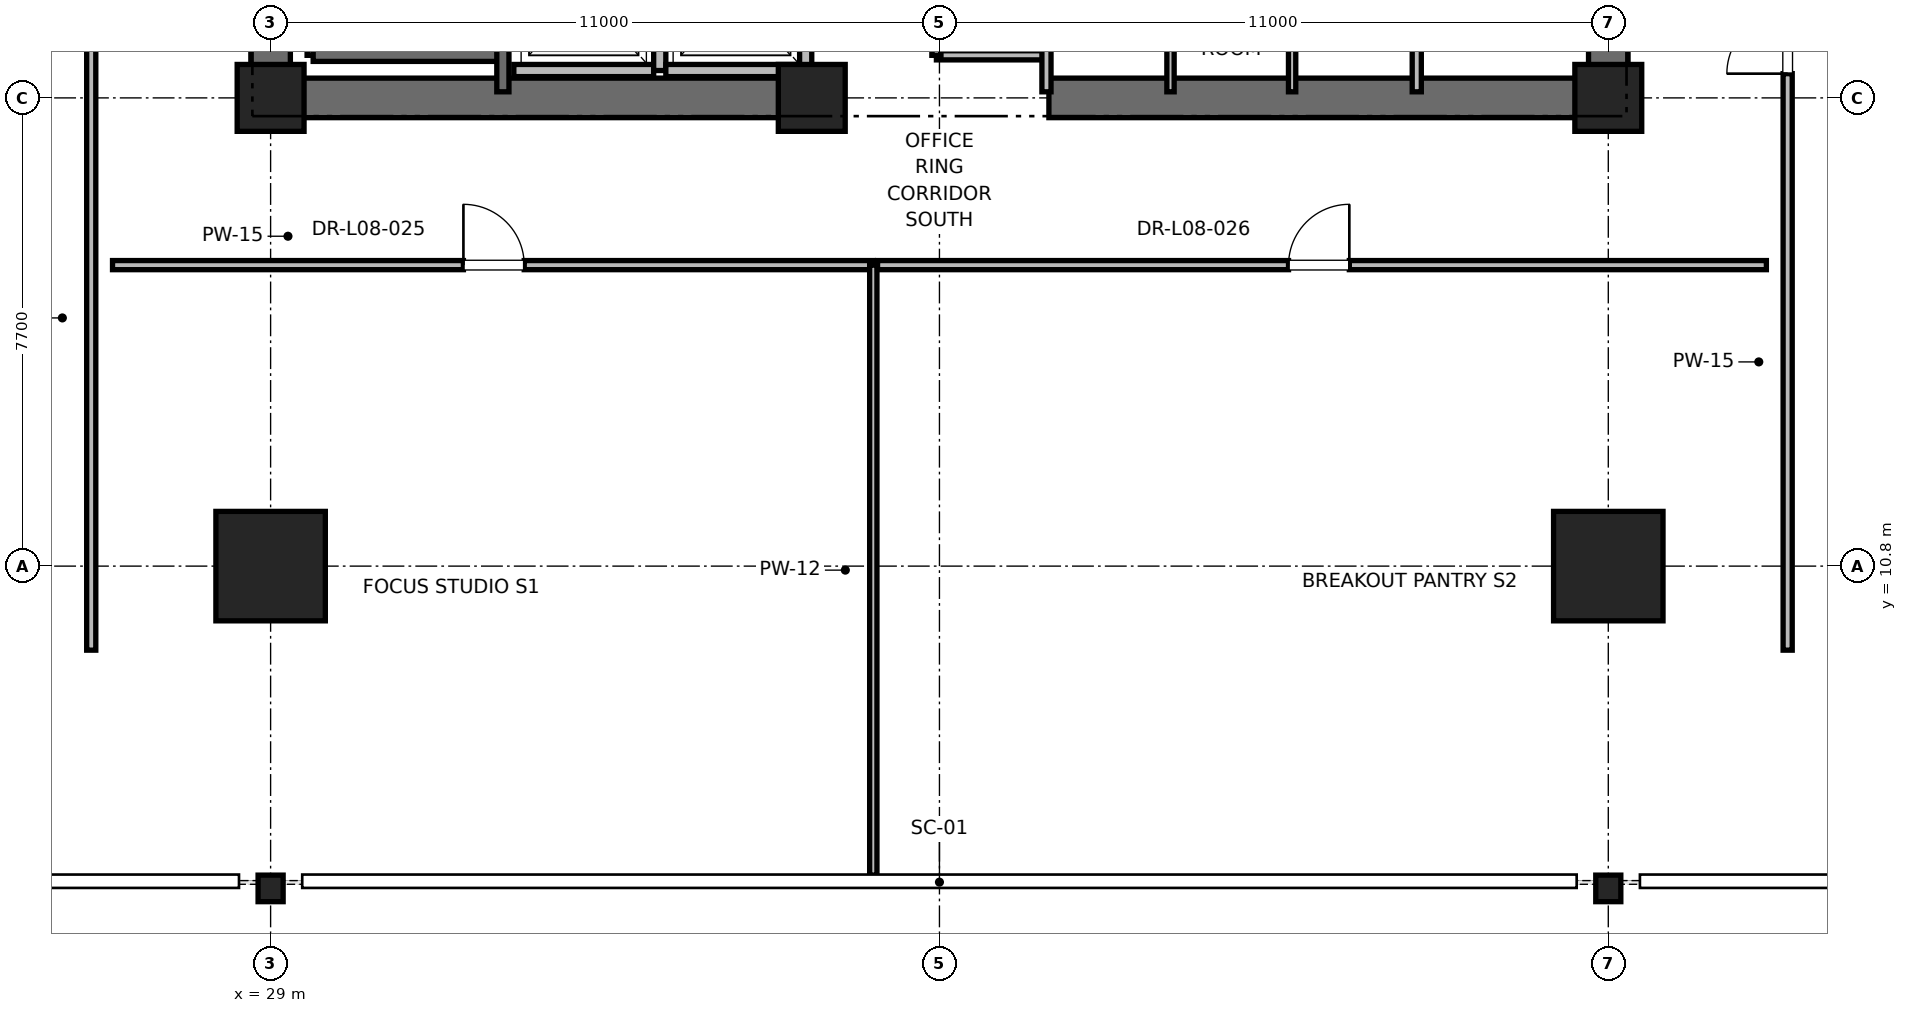
"""IFC4 building model, lengths in metres.
Left out: names, types, materials, properties, quantities, classifications, styles, units other than length and angle.
Written with IfcOpenShell. Run it as: python <this file> out.ifc"""

import sys

from ifc_helpers import new_model, si_unit, direction, frame, frame_2d, origin, origin_2d, place, context, subcontext, project, spatial, rectangle, i_section, extrude, element, fill, save


model = new_model("IFC4")
c1 = context("Model", 3, precision=1e-05, world=origin(), true_north=direction((0.0, 1.0)))
c2 = subcontext(c1, "Body", "Model", "MODEL_VIEW")
j1 = project(units=[si_unit("LENGTHUNIT", "METRE"), si_unit("PLANEANGLEUNIT", "RADIAN")], contexts=[c1])
p1 = place(None, origin())
s1 = spatial("IfcSite", under=j1, at=p1, CompositionType="ELEMENT")
p2 = place(p1, origin())
s2 = spatial("IfcBuilding", under=s1, at=p2, CompositionType="ELEMENT")
p3 = place(p2, frame((0.0, 0.0, 39.6)))
s3 = spatial("IfcBuildingStorey", under=s2, at=p3, CompositionType="ELEMENT", Elevation=39.6)
for number, where, z_axis, x_axis in (
    (1, (29.0, 10.8, 0.0), (0.0, 0.0, 1.0), (1.0, 0.0, 0.0)),
    (2, (51.0, 10.8, 0.0), (0.0, 0.0, 1.0), (1.0, 0.0, 0.0)),
):
    element("IfcColumn", number, at=place(p3, frame(where, z_axis=z_axis, x_axis=x_axis)), inside=s3, PredefinedType="COLUMN", context=c2, shape_type="SweptSolid", body=[
        extrude(rectangle(XDim=1.8, YDim=1.8, at=origin_2d()), origin(), (0.0, 0.0, 1.0), 4.0),
    ])
for number, where, z_axis, x_axis in (
    (3, (29.0, 5.5, 0.0), (0.0, 0.0, 1.0), (1.0, 0.0, 0.0)),
    (4, (51.0, 5.5, 0.0), (0.0, 0.0, 1.0), (1.0, 0.0, 0.0)),
):
    element("IfcColumn", number, at=place(p3, frame(where, z_axis=z_axis, x_axis=x_axis)), inside=s3, PredefinedType="COLUMN", context=c2, shape_type="SweptSolid", body=[
        extrude(i_section(OverallWidth=0.412, OverallDepth=0.437, WebThickness=0.036, FlangeThickness=0.058, FilletRadius=0.015, at=origin_2d()), origin(), (0.0, 0.0, 1.0), 4.0),
    ])
for number, where, z_axis, x_axis in (
    (5, (29.0, 18.5, 0.0), (0.0, 0.0, 1.0), (1.0, 0.0, 0.0)),
    (6, (51.0, 18.5, 0.0), (0.0, 0.0, 1.0), (1.0, 0.0, 0.0)),
    (7, (37.9, 18.5, 0.0), (0.0, 0.0, 1.0), (1.0, 0.0, 0.0)),
):
    element("IfcColumn", number, at=place(p3, frame(where, z_axis=z_axis, x_axis=x_axis)), inside=s3, PredefinedType="PILASTER", context=c2, shape_type="SweptSolid", body=[
        extrude(rectangle(XDim=1.1, YDim=1.1, at=origin_2d()), origin(), (0.0, 0.0, 1.0), 4.0),
    ])
for number, where, z_axis, x_axis in (
    (8, (29.0, 18.5, 0.0), (0.0, 0.0, 1.0), (1.0, 0.0, 0.0)),
    (9, (41.8, 18.5, 0.0), (0.0, 0.0, 1.0), (1.0, 0.0, 0.0)),
):
    element("IfcWall", number, at=place(p3, frame(where, z_axis=z_axis, x_axis=x_axis)), inside=s3, PredefinedType="SHEAR", context=c2, shape_type="SweptSolid", body=[
        extrude(rectangle(XDim=9.2, YDim=0.65, at=frame_2d((4.6, 0.0))), origin(), (0.0, 0.0, 1.0), 3.76),
    ])
p4 = place(p3, frame((29.0, 18.5, 0.0), z_axis=(0.0, 0.0, 1.0), x_axis=(0.0, 1.0, 0.0)))
e10 = element("IfcWall", 10, at=p4, inside=s3, PredefinedType="SHEAR", context=c2, shape_type="SweptSolid", body=[
    extrude(rectangle(XDim=8.8, YDim=0.65, at=frame_2d((4.4, 0.0))), origin(), (0.0, 0.0, 1.0), 3.76),
])
p5 = place(p3, frame((51.0, 18.5, 0.0), z_axis=(0.0, 0.0, 1.0), x_axis=(0.0, 1.0, 0.0)))
e11 = element("IfcWall", 11, at=p5, inside=s3, PredefinedType="SHEAR", context=c2, shape_type="SweptSolid", body=[
    extrude(rectangle(XDim=5.8, YDim=0.65, at=frame_2d((2.9, 0.0))), origin(), (0.0, 0.0, 1.0), 3.76),
])
p6 = place(p3, frame((29.7, 19.2, 0.0), z_axis=(0.0, 0.0, 1.0), x_axis=(0.0, 1.0, 0.0)))
e12 = element("IfcWall", 12, at=p6, inside=s3, PredefinedType="SOLIDWALL", context=c2, shape_type="SweptSolid", body=[
    extrude(rectangle(XDim=8.15, YDim=0.2, at=frame_2d((4.075, 0.0))), origin(), (0.0, 0.0, 1.0), 3.76),
])
p7 = place(p3, frame((29.7, 19.2, 0.0), z_axis=(0.0, 0.0, 1.0), x_axis=(1.0, 0.0, 0.0)))
e13 = element("IfcWall", 13, at=p7, inside=s3, PredefinedType="SOLIDWALL", context=c2, shape_type="SweptSolid", body=[
    extrude(rectangle(XDim=3.12, YDim=0.2, at=frame_2d((1.56, 0.0))), origin(), (0.0, 0.0, 1.0), 3.76),
])
p8 = place(p3, frame((32.82, 18.6, 0.0), z_axis=(0.0, 0.0, 1.0), x_axis=(0.0, 1.0, 0.0)))
e14 = element("IfcWall", 14, at=p8, inside=s3, PredefinedType="SOLIDWALL", context=c2, shape_type="SweptSolid", body=[
    extrude(rectangle(XDim=8.78, YDim=0.2, at=frame_2d((4.39, 0.0))), origin(), (0.0, 0.0, 1.0), 3.76),
])
p9 = place(p3, frame((33.0, 18.95, 0.0), z_axis=(0.0, 0.0, 1.0), x_axis=(1.0, 0.0, 0.0)))
e15 = element("IfcWall", 15, at=p9, inside=s3, PredefinedType="SOLIDWALL", context=c2, shape_type="SweptSolid", body=[
    extrude(rectangle(XDim=2.3, YDim=0.2, at=frame_2d((1.15, 0.0))), origin(), (0.0, 0.0, 1.0), 3.76),
])
p10 = place(p3, frame((35.4, 18.95, 0.0), z_axis=(0.0, 0.0, 1.0), x_axis=(0.0, 1.0, 0.0)))
e16 = element("IfcWall", 16, at=p10, inside=s3, PredefinedType="SOLIDWALL", context=c2, shape_type="SweptSolid", body=[
    extrude(rectangle(XDim=2.6, YDim=0.2, at=frame_2d((1.3, 0.0))), origin(), (0.0, 0.0, 1.0), 3.76),
])
p11 = place(p3, frame((35.5, 18.95, 0.0), z_axis=(0.0, 0.0, 1.0), x_axis=(1.0, 0.0, 0.0)))
e17 = element("IfcWall", 17, at=p11, inside=s3, PredefinedType="SOLIDWALL", context=c2, shape_type="SweptSolid", body=[
    extrude(rectangle(XDim=2.3, YDim=0.2, at=frame_2d((1.15, 0.0))), origin(), (0.0, 0.0, 1.0), 2.54),
])
p12 = place(p3, frame((37.8, 18.95, 0.0), z_axis=(0.0, 0.0, 1.0), x_axis=(0.0, 1.0, 0.0)))
e18 = element("IfcWall", 18, at=p12, inside=s3, PredefinedType="SOLIDWALL", context=c2, shape_type="SweptSolid", body=[
    extrude(rectangle(XDim=2.6, YDim=0.2, at=frame_2d((1.3, 0.0))), origin(), (0.0, 0.0, 1.0), 2.54),
])
p13 = place(p3, frame((39.95, 19.2, 0.0), z_axis=(0.0, 0.0, 1.0), x_axis=(1.0, 0.0, 0.0)))
e19 = element("IfcWall", 19, at=p13, inside=s3, PredefinedType="PARTITIONING", context=c2, shape_type="SweptSolid", body=[
    extrude(rectangle(XDim=1.81, YDim=0.15, at=frame_2d((0.905, 0.0))), origin(), (0.0, 0.0, 1.0), 2.85),
])
p14 = place(p3, frame((41.76, 18.6, 0.0), z_axis=(0.0, 0.0, 1.0), x_axis=(0.0, 1.0, 0.0)))
e20 = element("IfcWall", 20, at=p14, inside=s3, PredefinedType="PARTITIONING", context=c2, shape_type="SweptSolid", body=[
    extrude(rectangle(XDim=3.6, YDim=0.15, at=frame_2d((1.8, 0.0))), origin(), (0.0, 0.0, 1.0), 2.54),
])
p15 = place(p3, frame((39.95, 19.2, 0.0), z_axis=(0.0, 0.0, 1.0), x_axis=(0.0, 1.0, 0.0)))
e21 = element("IfcWall", 21, at=p15, inside=s3, PredefinedType="PARTITIONING", context=c2, shape_type="SweptSolid", body=[
    extrude(rectangle(XDim=3.0, YDim=0.15, at=frame_2d((1.5, 0.0))), origin(), (0.0, 0.0, 1.0), 2.85),
])
p16 = place(p15, frame((1.05, 0.0, 0.0)))
e22 = element("IfcOpeningElement", 22, at=p16, cuts=e21, PredefinedType="OPENING", context=c2, shape_type="SweptSolid", body=[
    extrude(rectangle(XDim=0.9, YDim=2.1, at=frame_2d((0.45, 1.05))), frame((0.0, 0.075, 0.0), z_axis=(0.0, -1.0, 0.0), x_axis=(1.0, 0.0, 0.0)), (0.0, 0.0, 1.0), 0.15),
])
p17 = place(p3, frame((47.85, 18.6, 0.0), z_axis=(0.0, 0.0, 1.0), x_axis=(0.0, 1.0, 0.0)))
e23 = element("IfcWall", 23, at=p17, inside=s3, PredefinedType="PARTITIONING", context=c2, shape_type="SweptSolid", body=[
    extrude(rectangle(XDim=2.54, YDim=0.15, at=frame_2d((1.27, 0.0))), origin(), (0.0, 0.0, 1.0), 2.85),
])
for number, where, z_axis, x_axis in (
    (24, (43.8, 18.6, 0.0), (0.0, 0.0, 1.0), (0.0, 1.0, 0.0)),
    (25, (45.8, 18.6, 0.0), (0.0, 0.0, 1.0), (0.0, 1.0, 0.0)),
):
    element("IfcWall", number, at=place(p3, frame(where, z_axis=z_axis, x_axis=x_axis)), inside=s3, PredefinedType="PARTITIONING", context=c2, shape_type="SweptSolid", body=[
        extrude(rectangle(XDim=3.02, YDim=0.12, at=frame_2d((1.51, 0.0))), origin(), (0.0, 0.0, 1.0), 2.85),
    ])
p18 = place(p3, frame((26.4, 15.75, 0.0), z_axis=(0.0, 0.0, 1.0), x_axis=(1.0, 0.0, 0.0)))
e26 = element("IfcWall", 26, at=p18, inside=s3, PredefinedType="PARTITIONING", context=c2, shape_type="SweptSolid", body=[
    extrude(rectangle(XDim=12.512, YDim=0.15, at=frame_2d((6.256, 0.0))), origin(), (0.0, 0.0, 1.0), 2.85),
])
p19 = place(p18, frame((5.771, 0.0, 0.0)))
e27 = element("IfcOpeningElement", 27, at=p19, cuts=e26, PredefinedType="OPENING", context=c2, shape_type="SweptSolid", body=[
    extrude(rectangle(XDim=1.0, YDim=2.15, at=frame_2d((0.5, 1.075))), frame((0.0, 0.075, 0.0), z_axis=(0.0, -1.0, 0.0), x_axis=(1.0, 0.0, 0.0)), (0.0, 0.0, 1.0), 0.15),
])
p20 = place(p3, frame((38.912, 5.718, 0.0), z_axis=(0.0, 0.0, 1.0), x_axis=(0.0, 1.0, 0.0)))
e28 = element("IfcWall", 28, at=p20, inside=s3, PredefinedType="PARTITIONING", context=c2, shape_type="SweptSolid", body=[
    extrude(rectangle(XDim=10.032, YDim=0.12, at=frame_2d((5.016, 0.0))), origin(), (0.0, 0.0, 1.0), 2.39),
])
p21 = place(p3, frame((38.982, 15.75, 0.0), z_axis=(0.0, 0.0, 1.0), x_axis=(1.0, 0.0, 0.0)))
e29 = element("IfcWall", 29, at=p21, inside=s3, PredefinedType="PARTITIONING", context=c2, shape_type="SweptSolid", body=[
    extrude(rectangle(XDim=14.618, YDim=0.15, at=frame_2d((7.309, 0.0))), origin(), (0.0, 0.0, 1.0), 2.85),
])
p22 = place(p21, frame((6.759, 0.0, 0.0)))
e30 = element("IfcOpeningElement", 30, at=p22, cuts=e29, PredefinedType="OPENING", context=c2, shape_type="SweptSolid", body=[
    extrude(rectangle(XDim=1.0, YDim=2.15, at=frame_2d((0.5, 1.075))), frame((0.0, 0.075, 0.0), z_axis=(0.0, -1.0, 0.0), x_axis=(1.0, 0.0, 0.0)), (0.0, 0.0, 1.0), 0.15),
])
p23 = place(p3, frame((26.05, 9.418, 0.0), z_axis=(0.0, 0.0, 1.0), x_axis=(0.0, 1.0, 0.0)))
e31 = element("IfcWall", 31, at=p23, inside=s3, PredefinedType="PARTITIONING", context=c2, shape_type="SweptSolid", body=[
    extrude(rectangle(XDim=13.743, YDim=0.15, at=frame_2d((6.871, 0.0))), origin(), (0.0, 0.0, 1.0), 2.85),
])
p24 = place(p23, frame((10.927, 0.0, 0.0)))
e32 = element("IfcOpeningElement", 32, at=p24, cuts=e31, PredefinedType="OPENING", context=c2, shape_type="SweptSolid", body=[
    extrude(rectangle(XDim=1.0, YDim=2.15, at=frame_2d((0.5, 1.075))), frame((0.0, 0.075, 0.0), z_axis=(0.0, -1.0, 0.0), x_axis=(1.0, 0.0, 0.0)), (0.0, 0.0, 1.0), 0.15),
])
p25 = place(p3, frame((53.95, 9.418, 0.0), z_axis=(0.0, 0.0, 1.0), x_axis=(0.0, 1.0, 0.0)))
e33 = element("IfcWall", 33, at=p25, inside=s3, PredefinedType="PARTITIONING", context=c2, shape_type="SweptSolid", body=[
    extrude(rectangle(XDim=10.849, YDim=0.15, at=frame_2d((5.425, 0.0))), origin(), (0.0, 0.0, 1.0), 2.85),
])
p26 = place(p25, frame((9.481, 0.0, 0.0)))
e34 = element("IfcOpeningElement", 34, at=p26, cuts=e33, PredefinedType="OPENING", context=c2, shape_type="SweptSolid", body=[
    extrude(rectangle(XDim=1.0, YDim=2.15, at=frame_2d((0.5, 1.075))), frame((0.0, 0.075, 0.0), z_axis=(0.0, -1.0, 0.0), x_axis=(1.0, 0.0, 0.0)), (0.0, 0.0, 1.0), 0.15),
])
p27 = place(p19, origin())
e35 = element("IfcDoor", 35, at=p27, inside=s3, OperationType="SINGLE_SWING_LEFT", PredefinedType="DOOR", context=c2, shape_type="SweptSolid", body=[
    extrude(rectangle(XDim=1.0, YDim=2.15, at=frame_2d((0.5, 1.075))), frame((0.0, 0.025, 0.0), z_axis=(0.0, -1.0, 0.0), x_axis=(1.0, 0.0, 0.0)), (0.0, 0.0, 1.0), 0.05),
])
fill(e27, e35)
p28 = place(p22, origin())
e36 = element("IfcDoor", 36, at=p28, inside=s3, OperationType="SINGLE_SWING_RIGHT", PredefinedType="DOOR", context=c2, shape_type="SweptSolid", body=[
    extrude(rectangle(XDim=1.0, YDim=2.15, at=frame_2d((0.5, 1.075))), frame((0.0, 0.025, 0.0), z_axis=(0.0, -1.0, 0.0), x_axis=(1.0, 0.0, 0.0)), (0.0, 0.0, 1.0), 0.05),
])
fill(e30, e36)
p29 = place(p26, origin())
e37 = element("IfcDoor", 37, at=p29, inside=s3, OperationType="SINGLE_SWING_LEFT", PredefinedType="DOOR", context=c2, shape_type="SweptSolid", body=[
    extrude(rectangle(XDim=1.0, YDim=2.15, at=frame_2d((0.5, 1.075))), frame((0.0, 0.025, 0.0), z_axis=(0.0, -1.0, 0.0), x_axis=(1.0, 0.0, 0.0)), (0.0, 0.0, 1.0), 0.05),
])
fill(e34, e37)
save(model, sys.argv[1])
